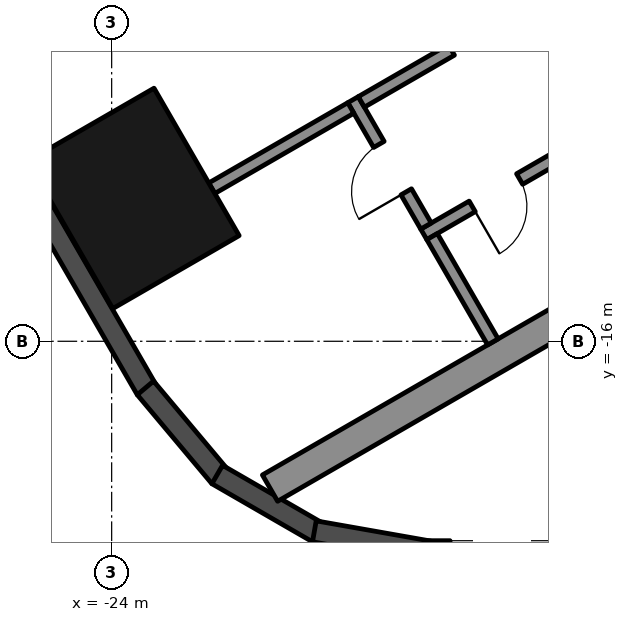
"""IFC4 building model, lengths in metres.
Left out: names, types, materials, properties, quantities, classifications, styles, units other than length and angle.
Written with IfcOpenShell. Run it as: python <this file> out.ifc"""

import sys

from ifc_helpers import new_model, si_unit, direction, frame, frame_2d, origin, origin_2d, place, context, subcontext, project, spatial, rectangle, hollow_rectangle, extrude, element, fill, save


model = new_model("IFC4")
c1 = context("Model", 3, precision=1e-05, world=origin(), true_north=direction((0.0, 1.0)))
c2 = subcontext(c1, "Body", "Model", "MODEL_VIEW")
j1 = project(units=[si_unit("LENGTHUNIT", "METRE"), si_unit("PLANEANGLEUNIT", "RADIAN")], contexts=[c1])
p1 = place(None, origin())
s1 = spatial("IfcSite", under=j1, at=p1, CompositionType="ELEMENT")
p2 = place(p1, origin())
s2 = spatial("IfcBuilding", under=s1, at=p2, CompositionType="ELEMENT")
p3 = place(p2, frame((0.0, 0.0, 65.0)))
s3 = spatial("IfcBuildingStorey", under=s2, at=p3, CompositionType="ELEMENT", Elevation=65.0)
p4 = place(p3, frame((-23.643, -13.65, 0.0), z_axis=(0.0, 0.0, 1.0), x_axis=(-0.5, 0.866025403784, 0.0)))
e1 = element("IfcColumn", 1, at=p4, inside=s3, PredefinedType="COLUMN", context=c2, shape_type="SweptSolid", body=[
    extrude(hollow_rectangle(XDim=2.8, YDim=2.4, WallThickness=0.07, at=origin_2d()), origin(), (0.0, 0.0, 1.0), 3.7),
])
p5 = place(p3, frame((-26.257, -11.893, 0.0), z_axis=(0.0, 0.0, 1.0), x_axis=(0.500018773155, -0.866014564827, 0.0)))
e2 = element("IfcWall", 2, at=p5, inside=s3, PredefinedType="SOLIDWALL", context=c2, shape_type="SweptSolid", body=[
    extrude(rectangle(XDim=5.658, YDim=0.35, at=frame_2d((2.829, 0.0))), origin(), (0.0, 0.0, 1.0), 3.55),
])
for number, where, z_axis, x_axis in (
    (3, (-23.445, -16.768, 0.0), (0.0, 0.0, 1.0), (0.643, -0.766, 0.0)),
    (4, (-22.264, -18.192, 0.0), (0.0, 0.0, 1.0), (0.866, -0.5, 0.0)),
):
    element("IfcWall", number, at=place(p3, frame(where, z_axis=z_axis, x_axis=x_axis)), inside=s3, PredefinedType="SOLIDWALL", context=c2, shape_type="SweptSolid", body=[
        extrude(rectangle(XDim=1.91, YDim=0.35, at=frame_2d((0.955, 0.0))), origin(), (0.0, 0.0, 1.0), 3.55),
    ])
p6 = place(p3, frame((-20.667, -19.126, 0.0), z_axis=(0.0, 0.0, 1.0), x_axis=(0.984798995425, -0.173697837091, 0.0)))
e5 = element("IfcWall", 5, at=p6, inside=s3, PredefinedType="SOLIDWALL", context=c2, shape_type="SweptSolid", body=[
    extrude(rectangle(XDim=1.91, YDim=0.35, at=frame_2d((0.955, 0.0))), origin(), (0.0, 0.0, 1.0), 3.55),
])
p7 = place(p3, frame((-18.816, -19.455, 0.0), z_axis=(0.0, 0.0, 1.0), x_axis=(1.0, 0.0, 0.0)))
e6 = element("IfcWall", 6, at=p7, inside=s3, PredefinedType="SOLIDWALL", context=c2, shape_type="SweptSolid", body=[
    extrude(rectangle(XDim=11.816, YDim=0.35, at=frame_2d((5.908, 0.0))), origin(), (0.0, 0.0, 1.0), 3.55),
])
p8 = place(p7, frame((0.381, 0.0, 0.3)))
e7 = element("IfcOpeningElement", 7, at=p8, cuts=e6, PredefinedType="OPENING", context=c2, shape_type="SweptSolid", body=[
    extrude(rectangle(XDim=1.7, YDim=2.65, at=frame_2d((0.85, 1.325))), frame((0.0, 0.185, 0.0), z_axis=(0.0, -1.0, 0.0), x_axis=(1.0, 0.0, 0.0)), (0.0, 0.0, 1.0), 0.37),
])
p9 = place(p7, frame((7.665, 0.0, 0.0)))
e8 = element("IfcOpeningElement", 8, at=p9, cuts=e6, PredefinedType="OPENING", context=c2, shape_type="SweptSolid", body=[
    extrude(rectangle(XDim=2.4, YDim=2.4, at=frame_2d((1.2, 1.2))), frame((0.0, 0.185, 0.0), z_axis=(0.0, -1.0, 0.0), x_axis=(1.0, 0.0, 0.0)), (0.0, 0.0, 1.0), 0.37),
])
p10 = place(p7, frame((3.866, 0.0, 0.3)))
e9 = element("IfcOpeningElement", 9, at=p10, cuts=e6, PredefinedType="OPENING", context=c2, shape_type="SweptSolid", body=[
    extrude(rectangle(XDim=1.5, YDim=2.65, at=frame_2d((0.75, 1.325))), frame((0.0, 0.185, 0.0), z_axis=(0.0, -1.0, 0.0), x_axis=(1.0, 0.0, 0.0)), (0.0, 0.0, 1.0), 0.37),
])
p11 = place(p7, frame((5.666, 0.0, 0.3)))
e10 = element("IfcOpeningElement", 10, at=p11, cuts=e6, PredefinedType="OPENING", context=c2, shape_type="SweptSolid", body=[
    extrude(rectangle(XDim=1.5, YDim=2.65, at=frame_2d((0.75, 1.325))), frame((0.0, 0.185, 0.0), z_axis=(0.0, -1.0, 0.0), x_axis=(1.0, 0.0, 0.0)), (0.0, 0.0, 1.0), 0.37),
])
p12 = place(p3, frame((-8.547, -10.997, 0.0), z_axis=(0.0, 0.0, 1.0), x_axis=(-0.866025009528, -0.500000682871, 0.0)))
e11 = element("IfcWall", 11, at=p12, inside=s3, PredefinedType="SHEAR", context=c2, shape_type="SweptSolid", body=[
    extrude(rectangle(XDim=14.837, YDim=0.5, at=frame_2d((7.418, 0.0))), origin(), (0.0, 0.0, 1.0), 3.5),
])
p13 = place(p3, frame((-10.068, -9.162, 0.0), z_axis=(0.0, 0.0, 1.0), x_axis=(-0.866032725843, -0.499987317609, 0.0)))
e12 = element("IfcWall", 12, at=p13, inside=s3, PredefinedType="SHEAR", context=c2, shape_type="SweptSolid", body=[
    extrude(rectangle(XDim=10.16, YDim=0.2, at=frame_2d((5.08, 0.0))), origin(), (0.0, 0.0, 1.0), 3.5),
])
p14 = place(p13, frame((3.26, 0.0, 0.0)))
e13 = element("IfcOpeningElement", 13, at=p14, cuts=e12, PredefinedType="OPENING", context=c2, shape_type="SweptSolid", body=[
    extrude(rectangle(XDim=0.9, YDim=2.1, at=frame_2d((0.45, 1.05))), frame((0.0, 0.11, 0.0), z_axis=(0.0, -1.0, 0.0), x_axis=(1.0, 0.0, 0.0)), (0.0, 0.0, 1.0), 0.22),
])
p15 = place(p13, frame((8.34, 0.0, 0.0)))
e14 = element("IfcOpeningElement", 14, at=p15, cuts=e12, PredefinedType="OPENING", context=c2, shape_type="SweptSolid", body=[
    extrude(rectangle(XDim=0.9, YDim=2.1, at=frame_2d((0.45, 1.05))), frame((0.0, 0.11, 0.0), z_axis=(0.0, -1.0, 0.0), x_axis=(1.0, 0.0, 0.0)), (0.0, 0.0, 1.0), 0.22),
])
p16 = place(p3, frame((-20.031, -12.026, 0.0), z_axis=(0.0, 0.0, 1.0), x_axis=(0.500033551112, -0.866006032174, 0.0)))
e15 = element("IfcWall", 15, at=p16, inside=s3, PredefinedType="SHEAR", context=c2, shape_type="SweptSolid", body=[
    extrude(rectangle(XDim=2.4, YDim=0.2, at=frame_2d((1.2, 0.0))), origin(), (0.0, 0.0, 1.0), 3.5),
])
p17 = place(p16, frame((0.85, 0.0, 0.0)))
e16 = element("IfcOpeningElement", 16, at=p17, cuts=e15, PredefinedType="OPENING", context=c2, shape_type="SweptSolid", body=[
    extrude(rectangle(XDim=0.9, YDim=2.1, at=frame_2d((0.45, 1.05))), frame((0.0, 0.11, 0.0), z_axis=(0.0, -1.0, 0.0), x_axis=(1.0, 0.0, 0.0)), (0.0, 0.0, 1.0), 0.22),
])
p18 = place(p3, frame((-18.413, -11.208, 0.0), z_axis=(0.0, 0.0, 1.0), x_axis=(-0.866038183914, -0.499977863513, 0.0)))
e17 = element("IfcWall", 17, at=p18, inside=s3, PredefinedType="SHEAR", context=c2, shape_type="SweptSolid", body=[
    extrude(rectangle(XDim=1.71, YDim=0.2, at=frame_2d((0.855, 0.0))), origin(), (0.0, 0.0, 1.0), 3.5),
])
p19 = place(p3, frame((-18.73, -14.278, 0.0), z_axis=(0.0, 0.0, 1.0), x_axis=(0.50002537861, -0.866010750942, 0.0)))
e18 = element("IfcWall", 18, at=p19, inside=s3, PredefinedType="SHEAR", context=c2, shape_type="SweptSolid", body=[
    extrude(rectangle(XDim=2.0, YDim=0.2, at=frame_2d((1.0, 0.0))), origin(), (0.0, 0.0, 1.0), 3.5),
])
p20 = place(p3, frame((-20.067, -12.163, 0.0), z_axis=(0.0, 0.0, 1.0), x_axis=(-0.866060851709, -0.499938597367, 0.0)))
e19 = element("IfcWall", 19, at=p20, inside=s3, PredefinedType="SHEAR", context=c2, shape_type="SweptSolid", body=[
    extrude(rectangle(XDim=2.64, YDim=0.2, at=frame_2d((1.32, 0.0))), origin(), (0.0, 0.0, 1.0), 3.5),
])
p21 = place(p15, origin())
e20 = element("IfcDoor", 20, at=p21, inside=s3, OperationType="SINGLE_SWING_RIGHT", PredefinedType="DOOR", context=c2, shape_type="SweptSolid", body=[
    extrude(rectangle(XDim=0.9, YDim=2.1, at=frame_2d((0.45, 1.05))), frame((0.0, 0.025, 0.0), z_axis=(0.0, -1.0, 0.0), x_axis=(1.0, 0.0, 0.0)), (0.0, 0.0, 1.0), 0.05),
])
fill(e14, e20)
p22 = place(p17, frame((0.9, 0.0, 0.0), z_axis=(0.0, 0.0, 1.0), x_axis=(-1.0, 0.0, 0.0)))
e21 = element("IfcDoor", 21, at=p22, inside=s3, OperationType="SINGLE_SWING_LEFT", PredefinedType="DOOR", context=c2, shape_type="SweptSolid", body=[
    extrude(rectangle(XDim=0.9, YDim=2.1, at=frame_2d((0.45, 1.05))), frame((0.0, 0.025, 0.0), z_axis=(0.0, -1.0, 0.0), x_axis=(1.0, 0.0, 0.0)), (0.0, 0.0, 1.0), 0.05),
])
fill(e16, e21)
save(model, sys.argv[1])
